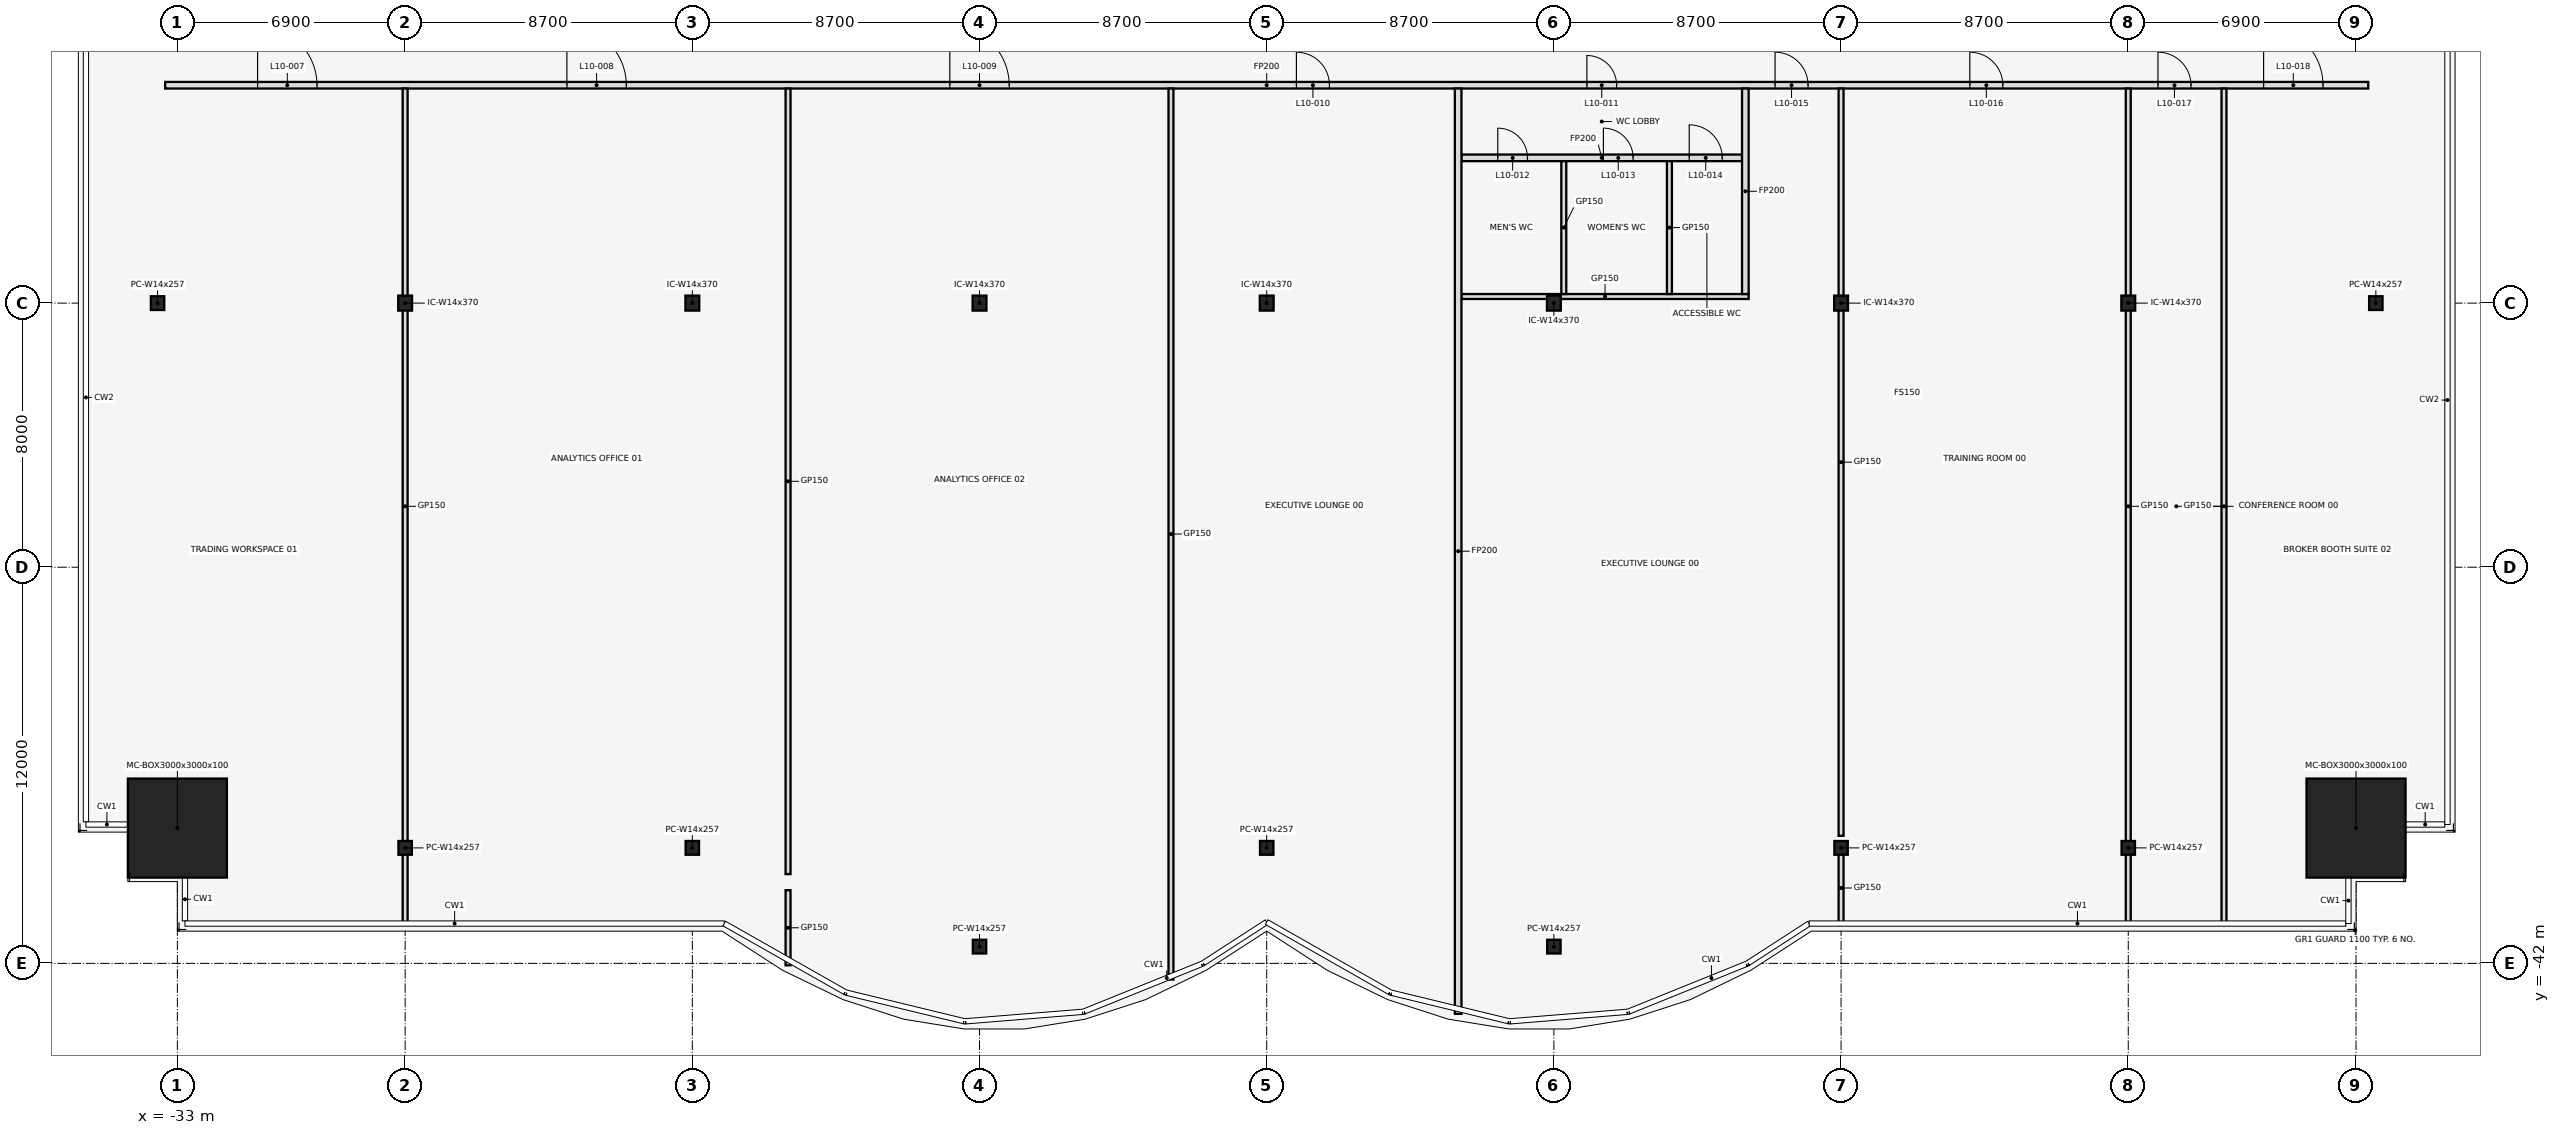
"""IFC4 building model, lengths in metres.
Left out: names, types, materials, properties, quantities, classifications, styles, units other than length and angle.
Written with IfcOpenShell. Run it as: python <this file> out.ifc"""

import sys

from ifc_helpers import new_model, si_unit, direction, frame, frame_2d, origin, origin_2d, place, context, subcontext, project, spatial, rectangle, hollow_rectangle, i_section, extrude, element, fill, save


model = new_model("IFC4")
c1 = context("Model", 3, precision=1e-05, world=origin(), true_north=direction((0.0, 1.0)))
c2 = subcontext(c1, "Body", "Model", "MODEL_VIEW")
j1 = project(units=[si_unit("LENGTHUNIT", "METRE"), si_unit("PLANEANGLEUNIT", "RADIAN")], contexts=[c1])
p1 = place(None, origin())
s1 = spatial("IfcSite", under=j1, at=p1, CompositionType="ELEMENT")
p2 = place(p1, origin())
s2 = spatial("IfcBuilding", under=s1, at=p2, CompositionType="ELEMENT")
p3 = place(p2, frame((0.0, 0.0, 53.0)))
s3 = spatial("IfcBuildingStorey", under=s2, at=p3, CompositionType="ELEMENT", Elevation=53.0)
p4 = place(p3, frame((-33.0, -37.902, 0.0), z_axis=(0.0, 0.0, 1.0), x_axis=(1.0, 0.0, 0.0)))
e1 = element("IfcColumn", 1, at=p4, inside=s3, PredefinedType="COLUMN", context=c2, shape_type="SweptSolid", body=[
    extrude(hollow_rectangle(XDim=3.0, YDim=3.0, WallThickness=0.1, at=origin_2d()), origin(), (0.0, 0.0, 1.0), 4.5),
])
for number, where, z_axis, x_axis in (
    (2, (-26.1, -38.502, 0.0), (0.0, 0.0, 1.0), (1.0, 0.0, 0.0)),
    (3, (-17.4, -38.502, 0.0), (0.0, 0.0, 1.0), (1.0, 0.0, 0.0)),
    (4, (-8.7, -41.493, 0.0), (0.0, 0.0, 1.0), (1.0, 0.0, 0.0)),
    (5, (0.0, -38.502, 0.0), (0.0, 0.0, 1.0), (1.0, 0.0, 0.0)),
    (6, (8.7, -41.493, 0.0), (0.0, 0.0, 1.0), (1.0, 0.0, 0.0)),
    (7, (17.4, -38.502, 0.0), (0.0, 0.0, 1.0), (1.0, 0.0, 0.0)),
    (8, (26.1, -38.502, 0.0), (0.0, 0.0, 1.0), (1.0, 0.0, 0.0)),
):
    element("IfcColumn", number, at=place(p3, frame(where, z_axis=z_axis, x_axis=x_axis)), inside=s3, PredefinedType="COLUMN", context=c2, shape_type="SweptSolid", body=[
        extrude(i_section(OverallWidth=0.406, OverallDepth=0.417, WebThickness=0.03, FlangeThickness=0.048, at=origin_2d()), origin(), (0.0, 0.0, 1.0), 4.5),
    ])
p5 = place(p3, frame((33.0, -37.902, 0.0), z_axis=(0.0, 0.0, 1.0), x_axis=(1.0, 0.0, 0.0)))
e9 = element("IfcColumn", 9, at=p5, inside=s3, PredefinedType="COLUMN", context=c2, shape_type="SweptSolid", body=[
    extrude(hollow_rectangle(XDim=3.0, YDim=3.0, WallThickness=0.1, at=origin_2d()), origin(), (0.0, 0.0, 1.0), 4.5),
])
for number, where, z_axis, x_axis in (
    (10, (-33.6, -22.0, 0.0), (0.0, 0.0, 1.0), (1.0, 0.0, 0.0)),
    (11, (33.6, -22.0, 0.0), (0.0, 0.0, 1.0), (1.0, 0.0, 0.0)),
):
    element("IfcColumn", number, at=place(p3, frame(where, z_axis=z_axis, x_axis=x_axis)), inside=s3, PredefinedType="COLUMN", context=c2, shape_type="SweptSolid", body=[
        extrude(i_section(OverallWidth=0.406, OverallDepth=0.417, WebThickness=0.03, FlangeThickness=0.048, at=origin_2d()), origin(), (0.0, 0.0, 1.0), 4.5),
    ])
for number, where, z_axis, x_axis in (
    (12, (-26.1, -22.0, 0.0), (0.0, 0.0, 1.0), (1.0, 0.0, 0.0)),
    (13, (-17.4, -22.0, 0.0), (0.0, 0.0, 1.0), (1.0, 0.0, 0.0)),
    (14, (-8.7, -22.0, 0.0), (0.0, 0.0, 1.0), (1.0, 0.0, 0.0)),
    (15, (0.0, -22.0, 0.0), (0.0, 0.0, 1.0), (1.0, 0.0, 0.0)),
    (16, (8.7, -22.0, 0.0), (0.0, 0.0, 1.0), (1.0, 0.0, 0.0)),
    (17, (17.4, -22.0, 0.0), (0.0, 0.0, 1.0), (1.0, 0.0, 0.0)),
    (18, (26.1, -22.0, 0.0), (0.0, 0.0, 1.0), (1.0, 0.0, 0.0)),
):
    element("IfcColumn", number, at=place(p3, frame(where, z_axis=z_axis, x_axis=x_axis)), inside=s3, PredefinedType="COLUMN", context=c2, shape_type="SweptSolid", body=[
        extrude(i_section(OverallWidth=0.419, OverallDepth=0.455, WebThickness=0.042, FlangeThickness=0.068, at=origin_2d()), origin(), (0.0, 0.0, 1.0), 4.5),
    ])
p6 = place(p3, frame((5.9, -21.8, 0.0), z_axis=(0.0, 0.0, 1.0), x_axis=(1.0, 0.0, 0.0)))
e19 = element("IfcWall", 19, at=p6, inside=s3, PredefinedType="PARTITIONING", context=c2, shape_type="SweptSolid", body=[
    extrude(rectangle(XDim=8.7, YDim=0.15, at=frame_2d((4.35, 0.0))), origin(), (0.0, 0.0, 1.0), 3.418),
])
p7 = place(p3, frame((5.9, -17.6, 0.0), z_axis=(0.0, 0.0, 1.0), x_axis=(1.0, 0.0, 0.0)))
e20 = element("IfcWall", 20, at=p7, inside=s3, PredefinedType="PARTITIONING", context=c2, shape_type="SweptSolid", body=[
    extrude(rectangle(XDim=8.5, YDim=0.2, at=frame_2d((4.25, 0.0))), origin(), (0.0, 0.0, 1.0), 3.418),
])
p8 = place(p7, frame((1.1, 0.0, 0.0)))
e21 = element("IfcOpeningElement", 21, at=p8, cuts=e20, PredefinedType="OPENING", context=c2, shape_type="SweptSolid", body=[
    extrude(rectangle(XDim=0.9, YDim=2.1, at=frame_2d((0.45, 1.05))), frame((0.0, 0.112, 0.0), z_axis=(0.0, -1.0, 0.0), x_axis=(1.0, 0.0, 0.0)), (0.0, 0.0, 1.0), 0.224),
])
p9 = place(p7, frame((4.3, 0.0, 0.0)))
e22 = element("IfcOpeningElement", 22, at=p9, cuts=e20, PredefinedType="OPENING", context=c2, shape_type="SweptSolid", body=[
    extrude(rectangle(XDim=0.9, YDim=2.1, at=frame_2d((0.45, 1.05))), frame((0.0, 0.112, 0.0), z_axis=(0.0, -1.0, 0.0), x_axis=(1.0, 0.0, 0.0)), (0.0, 0.0, 1.0), 0.224),
])
p10 = place(p7, frame((6.9, 0.0, 0.0)))
e23 = element("IfcOpeningElement", 23, at=p10, cuts=e20, PredefinedType="OPENING", context=c2, shape_type="SweptSolid", body=[
    extrude(rectangle(XDim=1.0, YDim=2.1, at=frame_2d((0.5, 1.05))), frame((0.0, 0.112, 0.0), z_axis=(0.0, -1.0, 0.0), x_axis=(1.0, 0.0, 0.0)), (0.0, 0.0, 1.0), 0.224),
])
p11 = place(p3, frame((-33.37, -15.4, 0.0), z_axis=(0.0, 0.0, 1.0), x_axis=(1.0, 0.0, 0.0)))
e24 = element("IfcWall", 24, at=p11, inside=s3, PredefinedType="PARTITIONING", context=c2, shape_type="SweptSolid", body=[
    extrude(rectangle(XDim=66.74, YDim=0.2, at=frame_2d((33.37, 0.0))), origin(), (0.0, 0.0, 1.0), 3.418),
])
p12 = place(p11, frame((2.8, 0.0, 0.0)))
e25 = element("IfcOpeningElement", 25, at=p12, cuts=e24, PredefinedType="OPENING", context=c2, shape_type="SweptSolid", body=[
    extrude(rectangle(XDim=1.8, YDim=2.1, at=frame_2d((0.9, 1.05))), frame((0.0, 0.112, 0.0), z_axis=(0.0, -1.0, 0.0), x_axis=(1.0, 0.0, 0.0)), (0.0, 0.0, 1.0), 0.224),
])
p13 = place(p11, frame((12.17, 0.0, 0.0)))
e26 = element("IfcOpeningElement", 26, at=p13, cuts=e24, PredefinedType="OPENING", context=c2, shape_type="SweptSolid", body=[
    extrude(rectangle(XDim=1.8, YDim=2.1, at=frame_2d((0.9, 1.05))), frame((0.0, 0.112, 0.0), z_axis=(0.0, -1.0, 0.0), x_axis=(1.0, 0.0, 0.0)), (0.0, 0.0, 1.0), 0.224),
])
p14 = place(p11, frame((23.77, 0.0, 0.0)))
e27 = element("IfcOpeningElement", 27, at=p14, cuts=e24, PredefinedType="OPENING", context=c2, shape_type="SweptSolid", body=[
    extrude(rectangle(XDim=1.8, YDim=2.1, at=frame_2d((0.9, 1.05))), frame((0.0, 0.112, 0.0), z_axis=(0.0, -1.0, 0.0), x_axis=(1.0, 0.0, 0.0)), (0.0, 0.0, 1.0), 0.224),
])
p15 = place(p11, frame((34.27, 0.0, 0.0)))
e28 = element("IfcOpeningElement", 28, at=p15, cuts=e24, PredefinedType="OPENING", context=c2, shape_type="SweptSolid", body=[
    extrude(rectangle(XDim=1.0, YDim=2.1, at=frame_2d((0.5, 1.05))), frame((0.0, 0.112, 0.0), z_axis=(0.0, -1.0, 0.0), x_axis=(1.0, 0.0, 0.0)), (0.0, 0.0, 1.0), 0.224),
])
p16 = place(p11, frame((43.07, 0.0, 0.0)))
e29 = element("IfcOpeningElement", 29, at=p16, cuts=e24, PredefinedType="OPENING", context=c2, shape_type="SweptSolid", body=[
    extrude(rectangle(XDim=0.9, YDim=2.1, at=frame_2d((0.45, 1.05))), frame((0.0, 0.112, 0.0), z_axis=(0.0, -1.0, 0.0), x_axis=(1.0, 0.0, 0.0)), (0.0, 0.0, 1.0), 0.224),
])
p17 = place(p11, frame((48.77, 0.0, 0.0)))
e30 = element("IfcOpeningElement", 30, at=p17, cuts=e24, PredefinedType="OPENING", context=c2, shape_type="SweptSolid", body=[
    extrude(rectangle(XDim=1.0, YDim=2.1, at=frame_2d((0.5, 1.05))), frame((0.0, 0.112, 0.0), z_axis=(0.0, -1.0, 0.0), x_axis=(1.0, 0.0, 0.0)), (0.0, 0.0, 1.0), 0.224),
])
p18 = place(p11, frame((54.67, 0.0, 0.0)))
e31 = element("IfcOpeningElement", 31, at=p18, cuts=e24, PredefinedType="OPENING", context=c2, shape_type="SweptSolid", body=[
    extrude(rectangle(XDim=1.0, YDim=2.1, at=frame_2d((0.5, 1.05))), frame((0.0, 0.112, 0.0), z_axis=(0.0, -1.0, 0.0), x_axis=(1.0, 0.0, 0.0)), (0.0, 0.0, 1.0), 0.224),
])
p19 = place(p11, frame((60.37, 0.0, 0.0)))
e32 = element("IfcOpeningElement", 32, at=p19, cuts=e24, PredefinedType="OPENING", context=c2, shape_type="SweptSolid", body=[
    extrude(rectangle(XDim=1.0, YDim=2.1, at=frame_2d((0.5, 1.05))), frame((0.0, 0.112, 0.0), z_axis=(0.0, -1.0, 0.0), x_axis=(1.0, 0.0, 0.0)), (0.0, 0.0, 1.0), 0.224),
])
p20 = place(p11, frame((63.57, 0.0, 0.0)))
e33 = element("IfcOpeningElement", 33, at=p20, cuts=e24, PredefinedType="OPENING", context=c2, shape_type="SweptSolid", body=[
    extrude(rectangle(XDim=1.8, YDim=2.1, at=frame_2d((0.9, 1.05))), frame((0.0, 0.112, 0.0), z_axis=(0.0, -1.0, 0.0), x_axis=(1.0, 0.0, 0.0)), (0.0, 0.0, 1.0), 0.224),
])
p21 = place(p3, frame((-26.1, -40.81, 0.0), z_axis=(0.0, 0.0, 1.0), x_axis=(0.0, 1.0, 0.0)))
e34 = element("IfcWall", 34, at=p21, inside=s3, PredefinedType="PARTITIONING", context=c2, shape_type="SweptSolid", body=[
    extrude(rectangle(XDim=25.31, YDim=0.15, at=frame_2d((12.655, 0.0))), origin(), (0.0, 0.0, 1.0), 3.418),
])
p22 = place(p3, frame((-14.5, -42.06, 0.0), z_axis=(0.0, 0.0, 1.0), x_axis=(0.0, 1.0, 0.0)))
e35 = element("IfcWall", 35, at=p22, inside=s3, PredefinedType="PARTITIONING", context=c2, shape_type="SweptSolid", body=[
    extrude(rectangle(XDim=2.277, YDim=0.15, at=frame_2d((1.138, 0.0))), origin(), (0.0, 0.0, 1.0), 3.418),
])
p23 = place(p3, frame((-14.5, -39.296, 0.0), z_axis=(0.0, 0.0, 1.0), x_axis=(0.0, 1.0, 0.0)))
e36 = element("IfcWall", 36, at=p23, inside=s3, PredefinedType="PARTITIONING", context=c2, shape_type="SweptSolid", body=[
    extrude(rectangle(XDim=23.796, YDim=0.15, at=frame_2d((11.898, 0.0))), origin(), (0.0, 0.0, 1.0), 3.418),
])
p24 = place(p3, frame((-2.9, -42.49, 0.0), z_axis=(0.0, 0.0, 1.0), x_axis=(0.0, 1.0, 0.0)))
e37 = element("IfcWall", 37, at=p24, inside=s3, PredefinedType="PARTITIONING", context=c2, shape_type="SweptSolid", body=[
    extrude(rectangle(XDim=26.99, YDim=0.15, at=frame_2d((13.495, 0.0))), origin(), (0.0, 0.0, 1.0), 3.418),
])
p25 = place(p3, frame((5.8, -43.53, 0.0), z_axis=(0.0, 0.0, 1.0), x_axis=(0.0, 1.0, 0.0)))
e38 = element("IfcWall", 38, at=p25, inside=s3, PredefinedType="PARTITIONING", context=c2, shape_type="SweptSolid", body=[
    extrude(rectangle(XDim=28.03, YDim=0.2, at=frame_2d((14.015, 0.0))), origin(), (0.0, 0.0, 1.0), 3.418),
])
for number, where, z_axis, x_axis in (
    (39, (9.0, -21.725, 0.0), (0.0, 0.0, 1.0), (0.0, 1.0, 0.0)),
    (40, (12.2, -21.725, 0.0), (0.0, 0.0, 1.0), (0.0, 1.0, 0.0)),
):
    element("IfcWall", number, at=place(p3, frame(where, z_axis=z_axis, x_axis=x_axis)), inside=s3, PredefinedType="PARTITIONING", context=c2, shape_type="SweptSolid", body=[
        extrude(rectangle(XDim=4.025, YDim=0.15, at=frame_2d((2.013, 0.0))), origin(), (0.0, 0.0, 1.0), 3.418),
    ])
p26 = place(p3, frame((14.5, -21.725, 0.0), z_axis=(0.0, 0.0, 1.0), x_axis=(0.0, 1.0, 0.0)))
e41 = element("IfcWall", 41, at=p26, inside=s3, PredefinedType="PARTITIONING", context=c2, shape_type="SweptSolid", body=[
    extrude(rectangle(XDim=6.225, YDim=0.2, at=frame_2d((3.113, 0.0))), origin(), (0.0, 0.0, 1.0), 3.418),
])
p27 = place(p3, frame((17.4, -40.81, 0.0), z_axis=(0.0, 0.0, 1.0), x_axis=(0.0, 1.0, 0.0)))
e42 = element("IfcWall", 42, at=p27, inside=s3, PredefinedType="PARTITIONING", context=c2, shape_type="SweptSolid", body=[
    extrude(rectangle(XDim=2.186, YDim=0.15, at=frame_2d((1.093, 0.0))), origin(), (0.0, 0.0, 1.0), 3.418),
])
p28 = place(p3, frame((17.4, -38.136, 0.0), z_axis=(0.0, 0.0, 1.0), x_axis=(0.0, 1.0, 0.0)))
e43 = element("IfcWall", 43, at=p28, inside=s3, PredefinedType="PARTITIONING", context=c2, shape_type="SweptSolid", body=[
    extrude(rectangle(XDim=22.636, YDim=0.15, at=frame_2d((11.318, 0.0))), origin(), (0.0, 0.0, 1.0), 3.418),
])
for number, where, z_axis, x_axis in (
    (44, (26.1, -40.81, 0.0), (0.0, 0.0, 1.0), (0.0, 1.0, 0.0)),
    (45, (29.0, -40.81, 0.0), (0.0, 0.0, 1.0), (0.0, 1.0, 0.0)),
):
    element("IfcWall", number, at=place(p3, frame(where, z_axis=z_axis, x_axis=x_axis)), inside=s3, PredefinedType="PARTITIONING", context=c2, shape_type="SweptSolid", body=[
        extrude(rectangle(XDim=25.31, YDim=0.15, at=frame_2d((12.655, 0.0))), origin(), (0.0, 0.0, 1.0), 3.418),
    ])
p29 = place(p12, origin())
e46 = element("IfcDoor", 46, at=p29, inside=s3, OperationType="SINGLE_SWING_LEFT", PredefinedType="DOOR", context=c2, shape_type="SweptSolid", body=[
    extrude(rectangle(XDim=1.8, YDim=2.1, at=frame_2d((0.9, 1.05))), frame((0.0, 0.025, 0.0), z_axis=(0.0, -1.0, 0.0), x_axis=(1.0, 0.0, 0.0)), (0.0, 0.0, 1.0), 0.05),
])
fill(e25, e46)
p30 = place(p13, origin())
e47 = element("IfcDoor", 47, at=p30, inside=s3, OperationType="SINGLE_SWING_LEFT", PredefinedType="DOOR", context=c2, shape_type="SweptSolid", body=[
    extrude(rectangle(XDim=1.8, YDim=2.1, at=frame_2d((0.9, 1.05))), frame((0.0, 0.025, 0.0), z_axis=(0.0, -1.0, 0.0), x_axis=(1.0, 0.0, 0.0)), (0.0, 0.0, 1.0), 0.05),
])
fill(e26, e47)
p31 = place(p14, origin())
e48 = element("IfcDoor", 48, at=p31, inside=s3, OperationType="SINGLE_SWING_LEFT", PredefinedType="DOOR", context=c2, shape_type="SweptSolid", body=[
    extrude(rectangle(XDim=1.8, YDim=2.1, at=frame_2d((0.9, 1.05))), frame((0.0, 0.025, 0.0), z_axis=(0.0, -1.0, 0.0), x_axis=(1.0, 0.0, 0.0)), (0.0, 0.0, 1.0), 0.05),
])
fill(e27, e48)
p32 = place(p15, frame((1.0, 0.0, 0.0), z_axis=(0.0, 0.0, 1.0), x_axis=(-1.0, 0.0, 0.0)))
e49 = element("IfcDoor", 49, at=p32, inside=s3, OperationType="SINGLE_SWING_LEFT", PredefinedType="DOOR", context=c2, shape_type="SweptSolid", body=[
    extrude(rectangle(XDim=1.0, YDim=2.1, at=frame_2d((0.5, 1.05))), frame((0.0, 0.025, 0.0), z_axis=(0.0, -1.0, 0.0), x_axis=(1.0, 0.0, 0.0)), (0.0, 0.0, 1.0), 0.05),
])
fill(e28, e49)
p33 = place(p16, frame((0.9, 0.0, 0.0), z_axis=(0.0, 0.0, 1.0), x_axis=(-1.0, 0.0, 0.0)))
e50 = element("IfcDoor", 50, at=p33, inside=s3, OperationType="SINGLE_SWING_RIGHT", PredefinedType="DOOR", context=c2, shape_type="SweptSolid", body=[
    extrude(rectangle(XDim=0.9, YDim=2.1, at=frame_2d((0.45, 1.05))), frame((0.0, 0.025, 0.0), z_axis=(0.0, -1.0, 0.0), x_axis=(1.0, 0.0, 0.0)), (0.0, 0.0, 1.0), 0.05),
])
fill(e29, e50)
p34 = place(p8, frame((0.9, 0.0, 0.0), z_axis=(0.0, 0.0, 1.0), x_axis=(-1.0, 0.0, 0.0)))
e51 = element("IfcDoor", 51, at=p34, inside=s3, OperationType="SINGLE_SWING_RIGHT", PredefinedType="DOOR", context=c2, shape_type="SweptSolid", body=[
    extrude(rectangle(XDim=0.9, YDim=2.1, at=frame_2d((0.45, 1.05))), frame((0.0, 0.025, 0.0), z_axis=(0.0, -1.0, 0.0), x_axis=(1.0, 0.0, 0.0)), (0.0, 0.0, 1.0), 0.05),
])
fill(e21, e51)
p35 = place(p9, frame((0.9, 0.0, 0.0), z_axis=(0.0, 0.0, 1.0), x_axis=(-1.0, 0.0, 0.0)))
e52 = element("IfcDoor", 52, at=p35, inside=s3, OperationType="SINGLE_SWING_LEFT", PredefinedType="DOOR", context=c2, shape_type="SweptSolid", body=[
    extrude(rectangle(XDim=0.9, YDim=2.1, at=frame_2d((0.45, 1.05))), frame((0.0, 0.025, 0.0), z_axis=(0.0, -1.0, 0.0), x_axis=(1.0, 0.0, 0.0)), (0.0, 0.0, 1.0), 0.05),
])
fill(e22, e52)
p36 = place(p10, frame((1.0, 0.0, 0.0), z_axis=(0.0, 0.0, 1.0), x_axis=(-1.0, 0.0, 0.0)))
e53 = element("IfcDoor", 53, at=p36, inside=s3, OperationType="SINGLE_SWING_RIGHT", PredefinedType="DOOR", context=c2, shape_type="SweptSolid", body=[
    extrude(rectangle(XDim=1.0, YDim=2.1, at=frame_2d((0.5, 1.05))), frame((0.0, 0.025, 0.0), z_axis=(0.0, -1.0, 0.0), x_axis=(1.0, 0.0, 0.0)), (0.0, 0.0, 1.0), 0.05),
])
fill(e23, e53)
p37 = place(p17, frame((1.0, 0.0, 0.0), z_axis=(0.0, 0.0, 1.0), x_axis=(-1.0, 0.0, 0.0)))
e54 = element("IfcDoor", 54, at=p37, inside=s3, OperationType="SINGLE_SWING_RIGHT", PredefinedType="DOOR", context=c2, shape_type="SweptSolid", body=[
    extrude(rectangle(XDim=1.0, YDim=2.1, at=frame_2d((0.5, 1.05))), frame((0.0, 0.025, 0.0), z_axis=(0.0, -1.0, 0.0), x_axis=(1.0, 0.0, 0.0)), (0.0, 0.0, 1.0), 0.05),
])
fill(e30, e54)
p38 = place(p18, frame((1.0, 0.0, 0.0), z_axis=(0.0, 0.0, 1.0), x_axis=(-1.0, 0.0, 0.0)))
e55 = element("IfcDoor", 55, at=p38, inside=s3, OperationType="SINGLE_SWING_LEFT", PredefinedType="DOOR", context=c2, shape_type="SweptSolid", body=[
    extrude(rectangle(XDim=1.0, YDim=2.1, at=frame_2d((0.5, 1.05))), frame((0.0, 0.025, 0.0), z_axis=(0.0, -1.0, 0.0), x_axis=(1.0, 0.0, 0.0)), (0.0, 0.0, 1.0), 0.05),
])
fill(e31, e55)
p39 = place(p19, frame((1.0, 0.0, 0.0), z_axis=(0.0, 0.0, 1.0), x_axis=(-1.0, 0.0, 0.0)))
e56 = element("IfcDoor", 56, at=p39, inside=s3, OperationType="SINGLE_SWING_RIGHT", PredefinedType="DOOR", context=c2, shape_type="SweptSolid", body=[
    extrude(rectangle(XDim=1.0, YDim=2.1, at=frame_2d((0.5, 1.05))), frame((0.0, 0.025, 0.0), z_axis=(0.0, -1.0, 0.0), x_axis=(1.0, 0.0, 0.0)), (0.0, 0.0, 1.0), 0.05),
])
fill(e32, e56)
p40 = place(p20, origin())
e57 = element("IfcDoor", 57, at=p40, inside=s3, OperationType="SINGLE_SWING_LEFT", PredefinedType="DOOR", context=c2, shape_type="SweptSolid", body=[
    extrude(rectangle(XDim=1.8, YDim=2.1, at=frame_2d((0.9, 1.05))), frame((0.0, 0.025, 0.0), z_axis=(0.0, -1.0, 0.0), x_axis=(1.0, 0.0, 0.0)), (0.0, 0.0, 1.0), 0.05),
])
fill(e33, e57)
save(model, sys.argv[1])
